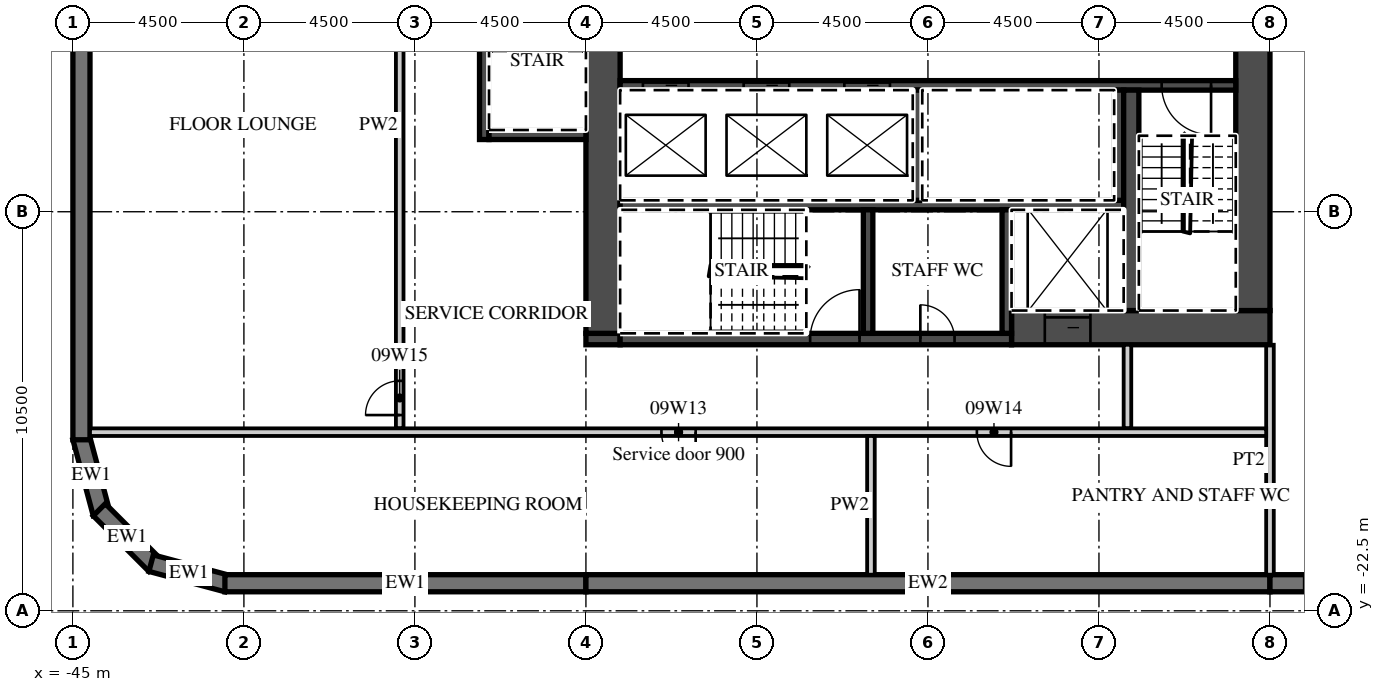
"""IFC4 building model, lengths in metres.
Left out: names, types, materials, properties, quantities, classifications, styles, units other than length and angle.
Written with IfcOpenShell. Run it as: python <this file> out.ifc"""

import sys

from ifc_helpers import new_model, si_unit, direction, frame, frame_2d, origin, place, context, subcontext, project, spatial, polyline, rectangle, outline, extrude, element, fill, save


model = new_model("IFC4")
c1 = context("Model", 3, precision=1e-05, world=origin(), true_north=direction((0.0, 1.0)))
c2 = subcontext(c1, "Body", "Model", "MODEL_VIEW")
j1 = project(units=[si_unit("LENGTHUNIT", "METRE"), si_unit("PLANEANGLEUNIT", "RADIAN")], contexts=[c1])
p1 = place(None, origin())
s1 = spatial("IfcSite", under=j1, at=p1, CompositionType="ELEMENT")
p2 = place(p1, origin())
s2 = spatial("IfcBuilding", under=s1, at=p2, CompositionType="ELEMENT")
p3 = place(p2, frame((0.0, 0.0, 60.0)))
s3 = spatial("IfcBuildingStorey", under=s2, at=p3, CompositionType="ELEMENT", Elevation=60.0)
p4 = place(p3, frame((-44.783, -17.942, 0.0), z_axis=(0.0, 0.0, 1.0), x_axis=(0.25881466832, -0.965926999034, 0.0)))
e1 = element("IfcWall", 1, at=p4, inside=s3, PredefinedType="SOLIDWALL", context=c2, shape_type="SweptSolid", body=[
    extrude(outline(polyline([(0.0, -0.225), (2.071, -0.225), (1.95, 0.225), (0.121, 0.225), (0.0, -0.225)])), origin(), (0.0, 0.0, 1.0), 3.02),
])
p5 = place(p3, frame((-44.305, -19.841, 0.0), z_axis=(0.0, 0.0, 1.0), x_axis=(0.707106781187, -0.707106781187, 0.0)))
e2 = element("IfcWall", 2, at=p5, inside=s3, PredefinedType="SOLIDWALL", context=c2, shape_type="SweptSolid", body=[
    extrude(outline(polyline([(0.0, -0.225), (2.071, -0.225), (1.95, 0.225), (0.121, 0.225), (0.0, -0.225)])), origin(), (0.0, 0.0, 1.0), 3.02),
])
p6 = place(p3, frame((-42.942, -21.247, 0.0), z_axis=(0.0, 0.0, 1.0), x_axis=(0.965926999034, -0.25881466832, 0.0)))
e3 = element("IfcWall", 3, at=p6, inside=s3, PredefinedType="SOLIDWALL", context=c2, shape_type="SweptSolid", body=[
    extrude(outline(polyline([(-0.0, -0.225), (2.07, -0.225), (1.95, 0.225), (0.12, 0.225), (-0.0, -0.225)])), origin(), (0.0, 0.0, 1.0), 3.02),
])
p7 = place(p3, frame((-41.0, -21.775, 0.0), z_axis=(0.0, 0.0, 1.0), x_axis=(1.0, 0.0, 0.0)))
e4 = element("IfcWall", 4, at=p7, inside=s3, PredefinedType="SOLIDWALL", context=c2, shape_type="SweptSolid", body=[
    extrude(rectangle(XDim=9.5, YDim=0.45, at=frame_2d((4.75, 0.0))), origin(), (0.0, 0.0, 1.0), 3.02),
])
p8 = place(p3, frame((-31.5, -21.775, 0.0), z_axis=(0.0, 0.0, 1.0), x_axis=(1.0, 0.0, 0.0)))
e5 = element("IfcWall", 5, at=p8, inside=s3, PredefinedType="SOLIDWALL", context=c2, shape_type="SweptSolid", body=[
    extrude(rectangle(XDim=18.0, YDim=0.45, at=frame_2d((9.0, 0.0))), origin(), (0.0, 0.0, 1.0), 3.02),
])
p9 = place(p3, frame((-13.5, -21.775, 0.0), z_axis=(0.0, 0.0, 1.0), x_axis=(1.0, 0.0, 0.0)))
e6 = element("IfcWall", 6, at=p9, inside=s3, PredefinedType="SOLIDWALL", context=c2, shape_type="SweptSolid", body=[
    extrude(rectangle(XDim=54.5, YDim=0.45, at=frame_2d((27.25, 0.0))), origin(), (0.0, 0.0, 1.0), 3.02),
])
p10 = place(p9, frame((0.9, 0.0, 0.45)))
e7 = element("IfcOpeningElement", 7, at=p10, cuts=e6, PredefinedType="OPENING", context=c2, shape_type="SweptSolid", body=[
    extrude(rectangle(XDim=2.7, YDim=2.25, at=frame_2d((1.35, 1.125))), frame((0.0, 0.235, 0.0), z_axis=(0.0, -1.0, 0.0), x_axis=(1.0, 0.0, 0.0)), (0.0, 0.0, 1.0), 0.47),
])
p11 = place(p9, frame((5.4, 0.0, 0.45)))
e8 = element("IfcOpeningElement", 8, at=p11, cuts=e6, PredefinedType="OPENING", context=c2, shape_type="SweptSolid", body=[
    extrude(rectangle(XDim=2.7, YDim=2.25, at=frame_2d((1.35, 1.125))), frame((0.0, 0.235, 0.0), z_axis=(0.0, -1.0, 0.0), x_axis=(1.0, 0.0, 0.0)), (0.0, 0.0, 1.0), 0.47),
])
p12 = place(p9, frame((9.9, 0.0, 0.45)))
e9 = element("IfcOpeningElement", 9, at=p12, cuts=e6, PredefinedType="OPENING", context=c2, shape_type="SweptSolid", body=[
    extrude(rectangle(XDim=2.7, YDim=2.25, at=frame_2d((1.35, 1.125))), frame((0.0, 0.235, 0.0), z_axis=(0.0, -1.0, 0.0), x_axis=(1.0, 0.0, 0.0)), (0.0, 0.0, 1.0), 0.47),
])
p13 = place(p9, frame((14.4, 0.0, 0.45)))
e10 = element("IfcOpeningElement", 10, at=p13, cuts=e6, PredefinedType="OPENING", context=c2, shape_type="SweptSolid", body=[
    extrude(rectangle(XDim=2.7, YDim=2.25, at=frame_2d((1.35, 1.125))), frame((0.0, 0.235, 0.0), z_axis=(0.0, -1.0, 0.0), x_axis=(1.0, 0.0, 0.0)), (0.0, 0.0, 1.0), 0.47),
])
p14 = place(p9, frame((18.9, 0.0, 0.45)))
e11 = element("IfcOpeningElement", 11, at=p14, cuts=e6, PredefinedType="OPENING", context=c2, shape_type="SweptSolid", body=[
    extrude(rectangle(XDim=2.7, YDim=2.25, at=frame_2d((1.35, 1.125))), frame((0.0, 0.235, 0.0), z_axis=(0.0, -1.0, 0.0), x_axis=(1.0, 0.0, 0.0)), (0.0, 0.0, 1.0), 0.47),
])
p15 = place(p9, frame((23.4, 0.0, 0.45)))
e12 = element("IfcOpeningElement", 12, at=p15, cuts=e6, PredefinedType="OPENING", context=c2, shape_type="SweptSolid", body=[
    extrude(rectangle(XDim=2.7, YDim=2.25, at=frame_2d((1.35, 1.125))), frame((0.0, 0.235, 0.0), z_axis=(0.0, -1.0, 0.0), x_axis=(1.0, 0.0, 0.0)), (0.0, 0.0, 1.0), 0.47),
])
p16 = place(p9, frame((27.9, 0.0, 0.45)))
e13 = element("IfcOpeningElement", 13, at=p16, cuts=e6, PredefinedType="OPENING", context=c2, shape_type="SweptSolid", body=[
    extrude(rectangle(XDim=2.7, YDim=2.25, at=frame_2d((1.35, 1.125))), frame((0.0, 0.235, 0.0), z_axis=(0.0, -1.0, 0.0), x_axis=(1.0, 0.0, 0.0)), (0.0, 0.0, 1.0), 0.47),
])
p17 = place(p9, frame((32.4, 0.0, 0.45)))
e14 = element("IfcOpeningElement", 14, at=p17, cuts=e6, PredefinedType="OPENING", context=c2, shape_type="SweptSolid", body=[
    extrude(rectangle(XDim=2.7, YDim=2.25, at=frame_2d((1.35, 1.125))), frame((0.0, 0.235, 0.0), z_axis=(0.0, -1.0, 0.0), x_axis=(1.0, 0.0, 0.0)), (0.0, 0.0, 1.0), 0.47),
])
p18 = place(p9, frame((36.9, 0.0, 0.45)))
e15 = element("IfcOpeningElement", 15, at=p18, cuts=e6, PredefinedType="OPENING", context=c2, shape_type="SweptSolid", body=[
    extrude(rectangle(XDim=2.7, YDim=2.25, at=frame_2d((1.35, 1.125))), frame((0.0, 0.235, 0.0), z_axis=(0.0, -1.0, 0.0), x_axis=(1.0, 0.0, 0.0)), (0.0, 0.0, 1.0), 0.47),
])
p19 = place(p9, frame((41.4, 0.0, 0.45)))
e16 = element("IfcOpeningElement", 16, at=p19, cuts=e6, PredefinedType="OPENING", context=c2, shape_type="SweptSolid", body=[
    extrude(rectangle(XDim=2.7, YDim=2.25, at=frame_2d((1.35, 1.125))), frame((0.0, 0.235, 0.0), z_axis=(0.0, -1.0, 0.0), x_axis=(1.0, 0.0, 0.0)), (0.0, 0.0, 1.0), 0.47),
])
p20 = place(p9, frame((45.9, 0.0, 0.45)))
e17 = element("IfcOpeningElement", 17, at=p20, cuts=e6, PredefinedType="OPENING", context=c2, shape_type="SweptSolid", body=[
    extrude(rectangle(XDim=2.7, YDim=2.25, at=frame_2d((1.35, 1.125))), frame((0.0, 0.235, 0.0), z_axis=(0.0, -1.0, 0.0), x_axis=(1.0, 0.0, 0.0)), (0.0, 0.0, 1.0), 0.47),
])
p21 = place(p9, frame((50.4, 0.0, 0.45)))
e18 = element("IfcOpeningElement", 18, at=p21, cuts=e6, PredefinedType="OPENING", context=c2, shape_type="SweptSolid", body=[
    extrude(rectangle(XDim=2.7, YDim=2.25, at=frame_2d((1.35, 1.125))), frame((0.0, 0.235, 0.0), z_axis=(0.0, -1.0, 0.0), x_axis=(1.0, 0.0, 0.0)), (0.0, 0.0, 1.0), 0.47),
])
p22 = place(p3, frame((-44.775, 18.0, 0.0), z_axis=(0.0, 0.0, 1.0), x_axis=(0.0, -1.0, 0.0)))
e19 = element("IfcWall", 19, at=p22, inside=s3, PredefinedType="SOLIDWALL", context=c2, shape_type="SweptSolid", body=[
    extrude(rectangle(XDim=36.0, YDim=0.45, at=frame_2d((18.0, 0.0))), origin(), (0.0, 0.0, 1.0), 3.02),
])
p23 = place(p22, frame((3.9, 0.0, 0.45)))
e20 = element("IfcOpeningElement", 20, at=p23, cuts=e19, PredefinedType="OPENING", context=c2, shape_type="SweptSolid", body=[
    extrude(rectangle(XDim=3.3, YDim=2.25, at=frame_2d((1.65, 1.125))), frame((0.0, 0.235, 0.0), z_axis=(0.0, -1.0, 0.0), x_axis=(1.0, 0.0, 0.0)), (0.0, 0.0, 1.0), 0.47),
])
p24 = place(p22, frame((8.4, 0.0, 0.45)))
e21 = element("IfcOpeningElement", 21, at=p24, cuts=e19, PredefinedType="OPENING", context=c2, shape_type="SweptSolid", body=[
    extrude(rectangle(XDim=3.3, YDim=2.25, at=frame_2d((1.65, 1.125))), frame((0.0, 0.235, 0.0), z_axis=(0.0, -1.0, 0.0), x_axis=(1.0, 0.0, 0.0)), (0.0, 0.0, 1.0), 0.47),
])
p25 = place(p22, frame((12.9, 0.0, 0.45)))
e22 = element("IfcOpeningElement", 22, at=p25, cuts=e19, PredefinedType="OPENING", context=c2, shape_type="SweptSolid", body=[
    extrude(rectangle(XDim=3.3, YDim=2.25, at=frame_2d((1.65, 1.125))), frame((0.0, 0.235, 0.0), z_axis=(0.0, -1.0, 0.0), x_axis=(1.0, 0.0, 0.0)), (0.0, 0.0, 1.0), 0.47),
])
p26 = place(p3, frame((-13.5, -21.55, 0.0), z_axis=(0.0, 0.0, 1.0), x_axis=(0.0, 1.0, 0.0)))
e23 = element("IfcWall", 23, at=p26, inside=s3, PredefinedType="PARTITIONING", context=c2, shape_type="SweptSolid", body=[
    extrude(rectangle(XDim=6.05, YDim=0.2, at=frame_2d((3.025, 0.0))), origin(), (0.0, 0.0, 1.0), 3.02),
])
p27 = place(p3, frame((-20.3, -15.05, 0.0), z_axis=(0.0, 0.0, 1.0), x_axis=(1.0, 0.0, 0.0)))
e24 = element("IfcWall", 24, at=p27, inside=s3, PredefinedType="SHEAR", context=c2, shape_type="SweptSolid", body=[
    extrude(rectangle(XDim=6.8, YDim=0.9, at=frame_2d((3.4, 0.0))), origin(), (0.0, 0.0, 1.0), 3.02),
])
p28 = place(p27, frame((0.875, 0.0, 0.0)))
e25 = element("IfcOpeningElement", 25, at=p28, cuts=e24, PredefinedType="OPENING", context=c2, shape_type="SweptSolid", body=[
    extrude(rectangle(XDim=1.2, YDim=2.1, at=frame_2d((0.6, 1.05))), frame((0.0, 0.46, 0.0), z_axis=(0.0, -1.0, 0.0), x_axis=(1.0, 0.0, 0.0)), (0.0, 0.0, 1.0), 0.92),
])
p29 = place(p3, frame((-31.5, -15.35, 0.0), z_axis=(0.0, 0.0, 1.0), x_axis=(1.0, 0.0, 0.0)))
e26 = element("IfcWall", 26, at=p29, inside=s3, PredefinedType="SHEAR", context=c2, shape_type="SweptSolid", body=[
    extrude(rectangle(XDim=0.9, YDim=0.3, at=frame_2d((0.45, 0.0))), origin(), (0.0, 0.0, 1.0), 3.02),
])
p30 = place(p3, frame((-30.6, -15.35, 0.0), z_axis=(0.0, 0.0, 1.0), x_axis=(1.0, 0.0, 0.0)))
e27 = element("IfcWall", 27, at=p30, inside=s3, PredefinedType="SHEAR", context=c2, shape_type="SweptSolid", body=[
    extrude(rectangle(XDim=10.3, YDim=0.3, at=frame_2d((5.15, 0.0))), origin(), (0.0, 0.0, 1.0), 3.02),
])
p31 = place(p30, frame((5.0, 0.0, 0.0)))
e28 = element("IfcOpeningElement", 28, at=p31, cuts=e27, PredefinedType="OPENING", context=c2, shape_type="SweptSolid", body=[
    extrude(rectangle(XDim=1.3, YDim=2.1, at=frame_2d((0.65, 1.05))), frame((0.0, 0.16, 0.0), z_axis=(0.0, -1.0, 0.0), x_axis=(1.0, 0.0, 0.0)), (0.0, 0.0, 1.0), 0.32),
])
p32 = place(p30, frame((7.9, 0.0, 0.0)))
e29 = element("IfcOpeningElement", 29, at=p32, cuts=e27, PredefinedType="OPENING", context=c2, shape_type="SweptSolid", body=[
    extrude(rectangle(XDim=0.9, YDim=2.1, at=frame_2d((0.45, 1.05))), frame((0.0, 0.16, 0.0), z_axis=(0.0, -1.0, 0.0), x_axis=(1.0, 0.0, 0.0)), (0.0, 0.0, 1.0), 0.32),
])
p33 = place(p3, frame((-31.05, -15.2, 0.0), z_axis=(0.0, 0.0, 1.0), x_axis=(0.0, 1.0, 0.0)))
e30 = element("IfcWall", 30, at=p33, inside=s3, PredefinedType="SHEAR", context=c2, shape_type="SweptSolid", body=[
    extrude(rectangle(XDim=12.8, YDim=0.9, at=frame_2d((6.4, 0.0))), origin(), (0.0, 0.0, 1.0), 3.02),
])
p34 = place(p33, frame((11.5, 0.0, 0.0)))
e31 = element("IfcOpeningElement", 31, at=p34, cuts=e30, PredefinedType="OPENING", context=c2, shape_type="SweptSolid", body=[
    extrude(rectangle(XDim=1.1, YDim=2.1, at=frame_2d((0.55, 1.05))), frame((0.0, 0.46, 0.0), z_axis=(0.0, -1.0, 0.0), x_axis=(1.0, 0.0, 0.0)), (0.0, 0.0, 1.0), 0.92),
])
p35 = place(p3, frame((-13.95, -14.6, 0.0), z_axis=(0.0, 0.0, 1.0), x_axis=(0.0, 1.0, 0.0)))
e32 = element("IfcWall", 32, at=p35, inside=s3, PredefinedType="SHEAR", context=c2, shape_type="SweptSolid", body=[
    extrude(rectangle(XDim=12.2, YDim=0.9, at=frame_2d((6.1, 0.0))), origin(), (0.0, 0.0, 1.0), 3.02),
])
p36 = place(p3, frame((-30.6, -8.675, 0.0), z_axis=(0.0, 0.0, 1.0), x_axis=(1.0, 0.0, 0.0)))
e33 = element("IfcWall", 33, at=p36, inside=s3, PredefinedType="SHEAR", context=c2, shape_type="SweptSolid", body=[
    extrude(rectangle(XDim=16.2, YDim=0.25, at=frame_2d((8.1, 0.0))), origin(), (0.0, 0.0, 1.0), 3.02),
])
p37 = place(p36, frame((0.6, 0.0, 0.0)))
e34 = element("IfcOpeningElement", 34, at=p37, cuts=e33, PredefinedType="OPENING", context=c2, shape_type="SweptSolid", body=[
    extrude(rectangle(XDim=1.2, YDim=2.1, at=frame_2d((0.6, 1.05))), frame((0.0, 0.135, 0.0), z_axis=(0.0, -1.0, 0.0), x_axis=(1.0, 0.0, 0.0)), (0.0, 0.0, 1.0), 0.27),
])
p38 = place(p36, frame((3.25, 0.0, 0.0)))
e35 = element("IfcOpeningElement", 35, at=p38, cuts=e33, PredefinedType="OPENING", context=c2, shape_type="SweptSolid", body=[
    extrude(rectangle(XDim=1.2, YDim=2.1, at=frame_2d((0.6, 1.05))), frame((0.0, 0.135, 0.0), z_axis=(0.0, -1.0, 0.0), x_axis=(1.0, 0.0, 0.0)), (0.0, 0.0, 1.0), 0.27),
])
p39 = place(p36, frame((5.9, 0.0, 0.0)))
e36 = element("IfcOpeningElement", 36, at=p39, cuts=e33, PredefinedType="OPENING", context=c2, shape_type="SweptSolid", body=[
    extrude(rectangle(XDim=1.2, YDim=2.1, at=frame_2d((0.6, 1.05))), frame((0.0, 0.135, 0.0), z_axis=(0.0, -1.0, 0.0), x_axis=(1.0, 0.0, 0.0)), (0.0, 0.0, 1.0), 0.27),
])
p40 = place(p36, frame((14.25, 0.0, 0.0)))
e37 = element("IfcOpeningElement", 37, at=p40, cuts=e33, PredefinedType="OPENING", context=c2, shape_type="SweptSolid", body=[
    extrude(rectangle(XDim=1.3, YDim=2.1, at=frame_2d((0.65, 1.05))), frame((0.0, 0.135, 0.0), z_axis=(0.0, -1.0, 0.0), x_axis=(1.0, 0.0, 0.0)), (0.0, 0.0, 1.0), 0.27),
])
p41 = place(p3, frame((-30.6, -11.825, 0.0), z_axis=(0.0, 0.0, 1.0), x_axis=(1.0, 0.0, 0.0)))
e38 = element("IfcWall", 38, at=p41, inside=s3, PredefinedType="SHEAR", context=c2, shape_type="SweptSolid", body=[
    extrude(rectangle(XDim=13.25, YDim=0.25, at=frame_2d((6.625, 0.0))), origin(), (0.0, 0.0, 1.0), 3.02),
])
for number, where, z_axis, x_axis in (
    (39, (-17.475, -11.7, 0.0), (0.0, 0.0, 1.0), (0.0, 1.0, 0.0)),
    (40, (-22.775, -11.7, 0.0), (0.0, 0.0, 1.0), (0.0, 1.0, 0.0)),
):
    element("IfcWall", number, at=place(p3, frame(where, z_axis=z_axis, x_axis=x_axis)), inside=s3, PredefinedType="SHEAR", context=c2, shape_type="SweptSolid", body=[
        extrude(rectangle(XDim=2.9, YDim=0.25, at=frame_2d((1.45, 0.0))), origin(), (0.0, 0.0, 1.0), 3.02),
    ])
p42 = place(p3, frame((-17.15, -14.6, 0.0), z_axis=(0.0, 0.0, 1.0), x_axis=(0.0, 1.0, 0.0)))
e41 = element("IfcWall", 41, at=p42, inside=s3, PredefinedType="SHEAR", context=c2, shape_type="SweptSolid", body=[
    extrude(rectangle(XDim=5.8, YDim=0.4, at=frame_2d((2.9, 0.0))), origin(), (0.0, 0.0, 1.0), 3.02),
])
for number, where, z_axis, x_axis in (
    (42, (-20.425, -15.2, 0.0), (0.0, 0.0, 1.0), (0.0, 1.0, 0.0)),
    (43, (-24.075, -15.2, 0.0), (0.0, 0.0, 1.0), (0.0, 1.0, 0.0)),
):
    element("IfcWall", number, at=place(p3, frame(where, z_axis=z_axis, x_axis=x_axis)), inside=s3, PredefinedType="SHEAR", context=c2, shape_type="SweptSolid", body=[
        extrude(rectangle(XDim=3.25, YDim=0.25, at=frame_2d((1.625, 0.0))), origin(), (0.0, 0.0, 1.0), 3.02),
    ])
p43 = place(p3, frame((-34.175, -10.1, 0.0), z_axis=(0.0, 0.0, 1.0), x_axis=(0.0, 1.0, 0.0)))
e44 = element("IfcWall", 44, at=p43, inside=s3, PredefinedType="SHEAR", context=c2, shape_type="SweptSolid", body=[
    extrude(rectangle(XDim=8.35, YDim=0.25, at=frame_2d((4.175, 0.0))), origin(), (0.0, 0.0, 1.0), 3.02),
])
p44 = place(p3, frame((-34.05, -9.975, 0.0), z_axis=(0.0, 0.0, 1.0), x_axis=(1.0, 0.0, 0.0)))
e45 = element("IfcWall", 45, at=p44, inside=s3, PredefinedType="SHEAR", context=c2, shape_type="SweptSolid", body=[
    extrude(rectangle(XDim=2.55, YDim=0.25, at=frame_2d((1.275, 0.0))), origin(), (0.0, 0.0, 1.0), 3.02),
])
p45 = place(p3, frame((-17.25, -17.7, 0.0), z_axis=(0.0, 0.0, 1.0), x_axis=(0.0, 1.0, 0.0)))
e46 = element("IfcWall", 46, at=p45, inside=s3, PredefinedType="PARTITIONING", context=c2, shape_type="SweptSolid", body=[
    extrude(rectangle(XDim=2.2, YDim=0.2, at=frame_2d((1.1, 0.0))), origin(), (0.0, 0.0, 1.0), 3.02),
])
p46 = place(p3, frame((-36.4, -17.7, 0.0), z_axis=(0.0, 0.0, 1.0), x_axis=(0.0, 1.0, 0.0)))
e47 = element("IfcWall", 47, at=p46, inside=s3, PredefinedType="PARTITIONING", context=c2, shape_type="SweptSolid", body=[
    extrude(rectangle(XDim=15.95, YDim=0.2, at=frame_2d((7.975, 0.0))), origin(), (0.0, 0.0, 1.0), 3.02),
])
p47 = place(p46, frame((0.35, 0.0, 0.0)))
e48 = element("IfcOpeningElement", 48, at=p47, cuts=e47, PredefinedType="OPENING", context=c2, shape_type="SweptSolid", body=[
    extrude(rectangle(XDim=0.9, YDim=2.1, at=frame_2d((0.45, 1.05))), frame((0.0, 0.11, 0.0), z_axis=(0.0, -1.0, 0.0), x_axis=(1.0, 0.0, 0.0)), (0.0, 0.0, 1.0), 0.22),
])
p48 = place(p3, frame((-44.55, -17.8, 0.0), z_axis=(0.0, 0.0, 1.0), x_axis=(1.0, 0.0, 0.0)))
e49 = element("IfcWall", 49, at=p48, inside=s3, PredefinedType="PARTITIONING", context=c2, shape_type="SweptSolid", body=[
    extrude(rectangle(XDim=30.95, YDim=0.2, at=frame_2d((15.475, 0.0))), origin(), (0.0, 0.0, 1.0), 3.02),
])
p49 = place(p48, frame((15.038, 0.0, 0.0)))
e50 = element("IfcOpeningElement", 50, at=p49, cuts=e49, PredefinedType="OPENING", context=c2, shape_type="SweptSolid", body=[
    extrude(rectangle(XDim=0.9, YDim=2.1, at=frame_2d((0.45, 1.05))), frame((0.0, 0.11, 0.0), z_axis=(0.0, -1.0, 0.0), x_axis=(1.0, 0.0, 0.0)), (0.0, 0.0, 1.0), 0.22),
])
p50 = place(p48, frame((23.337, 0.0, 0.0)))
e51 = element("IfcOpeningElement", 51, at=p50, cuts=e49, PredefinedType="OPENING", context=c2, shape_type="SweptSolid", body=[
    extrude(rectangle(XDim=0.9, YDim=2.1, at=frame_2d((0.45, 1.05))), frame((0.0, 0.11, 0.0), z_axis=(0.0, -1.0, 0.0), x_axis=(1.0, 0.0, 0.0)), (0.0, 0.0, 1.0), 0.22),
])
p51 = place(p3, frame((-24.0, -21.55, 0.0), z_axis=(0.0, 0.0, 1.0), x_axis=(0.0, 1.0, 0.0)))
e52 = element("IfcWall", 52, at=p51, inside=s3, PredefinedType="PARTITIONING", context=c2, shape_type="SweptSolid", body=[
    extrude(rectangle(XDim=3.65, YDim=0.2, at=frame_2d((1.825, 0.0))), origin(), (0.0, 0.0, 1.0), 3.02),
])
p52 = place(p37, origin())
e53 = element("IfcDoor", 53, at=p52, inside=s3, OperationType="SLIDING_TO_LEFT", PredefinedType="DOOR", context=c2, shape_type="SweptSolid", body=[
    extrude(rectangle(XDim=1.2, YDim=2.1, at=frame_2d((0.6, 1.05))), frame((0.0, 0.025, 0.0), z_axis=(0.0, -1.0, 0.0), x_axis=(1.0, 0.0, 0.0)), (0.0, 0.0, 1.0), 0.05),
])
fill(e34, e53)
p53 = place(p38, origin())
e54 = element("IfcDoor", 54, at=p53, inside=s3, OperationType="SLIDING_TO_RIGHT", PredefinedType="DOOR", context=c2, shape_type="SweptSolid", body=[
    extrude(rectangle(XDim=1.2, YDim=2.1, at=frame_2d((0.6, 1.05))), frame((0.0, 0.025, 0.0), z_axis=(0.0, -1.0, 0.0), x_axis=(1.0, 0.0, 0.0)), (0.0, 0.0, 1.0), 0.05),
])
fill(e35, e54)
p54 = place(p39, origin())
e55 = element("IfcDoor", 55, at=p54, inside=s3, OperationType="SLIDING_TO_RIGHT", PredefinedType="DOOR", context=c2, shape_type="SweptSolid", body=[
    extrude(rectangle(XDim=1.2, YDim=2.1, at=frame_2d((0.6, 1.05))), frame((0.0, 0.025, 0.0), z_axis=(0.0, -1.0, 0.0), x_axis=(1.0, 0.0, 0.0)), (0.0, 0.0, 1.0), 0.05),
])
fill(e36, e55)
p55 = place(p28, origin())
e56 = element("IfcDoor", 56, at=p55, inside=s3, OperationType="SLIDING_TO_LEFT", PredefinedType="DOOR", context=c2, shape_type="SweptSolid", body=[
    extrude(rectangle(XDim=1.2, YDim=2.1, at=frame_2d((0.6, 1.05))), frame((0.0, 0.025, 0.0), z_axis=(0.0, -1.0, 0.0), x_axis=(1.0, 0.0, 0.0)), (0.0, 0.0, 1.0), 0.05),
])
fill(e25, e56)
p56 = place(p40, origin())
e57 = element("IfcDoor", 57, at=p56, inside=s3, OperationType="SINGLE_SWING_RIGHT", PredefinedType="DOOR", context=c2, shape_type="SweptSolid", body=[
    extrude(rectangle(XDim=1.3, YDim=2.1, at=frame_2d((0.65, 1.05))), frame((0.0, 0.025, 0.0), z_axis=(0.0, -1.0, 0.0), x_axis=(1.0, 0.0, 0.0)), (0.0, 0.0, 1.0), 0.05),
])
fill(e37, e57)
p57 = place(p31, origin())
e58 = element("IfcDoor", 58, at=p57, inside=s3, OperationType="SINGLE_SWING_RIGHT", PredefinedType="DOOR", context=c2, shape_type="SweptSolid", body=[
    extrude(rectangle(XDim=1.3, YDim=2.1, at=frame_2d((0.65, 1.05))), frame((0.0, 0.025, 0.0), z_axis=(0.0, -1.0, 0.0), x_axis=(1.0, 0.0, 0.0)), (0.0, 0.0, 1.0), 0.05),
])
fill(e28, e58)
p58 = place(p32, origin())
e59 = element("IfcDoor", 59, at=p58, inside=s3, OperationType="SINGLE_SWING_LEFT", PredefinedType="DOOR", context=c2, shape_type="SweptSolid", body=[
    extrude(rectangle(XDim=0.9, YDim=2.1, at=frame_2d((0.45, 1.05))), frame((0.0, 0.025, 0.0), z_axis=(0.0, -1.0, 0.0), x_axis=(1.0, 0.0, 0.0)), (0.0, 0.0, 1.0), 0.05),
])
fill(e29, e59)
p59 = place(p49, origin())
e60 = element("IfcDoor", 60, at=p59, inside=s3, OperationType="SINGLE_SWING_RIGHT", PredefinedType="DOOR", context=c2, shape_type="SweptSolid", body=[
    extrude(rectangle(XDim=0.9, YDim=2.1, at=frame_2d((0.45, 1.05))), frame((0.0, 0.025, 0.0), z_axis=(0.0, -1.0, 0.0), x_axis=(1.0, 0.0, 0.0)), (0.0, 0.0, 1.0), 0.05),
])
fill(e50, e60)
p60 = place(p50, origin())
e61 = element("IfcDoor", 61, at=p60, inside=s3, OperationType="SINGLE_SWING_RIGHT", PredefinedType="DOOR", context=c2, shape_type="SweptSolid", body=[
    extrude(rectangle(XDim=0.9, YDim=2.1, at=frame_2d((0.45, 1.05))), frame((0.0, 0.025, 0.0), z_axis=(0.0, -1.0, 0.0), x_axis=(1.0, 0.0, 0.0)), (0.0, 0.0, 1.0), 0.05),
])
fill(e51, e61)
p61 = place(p47, origin())
e62 = element("IfcDoor", 62, at=p61, inside=s3, OperationType="SINGLE_SWING_LEFT", PredefinedType="DOOR", context=c2, shape_type="SweptSolid", body=[
    extrude(rectangle(XDim=0.9, YDim=2.1, at=frame_2d((0.45, 1.05))), frame((0.0, 0.025, 0.0), z_axis=(0.0, -1.0, 0.0), x_axis=(1.0, 0.0, 0.0)), (0.0, 0.0, 1.0), 0.05),
])
fill(e48, e62)
save(model, sys.argv[1])
